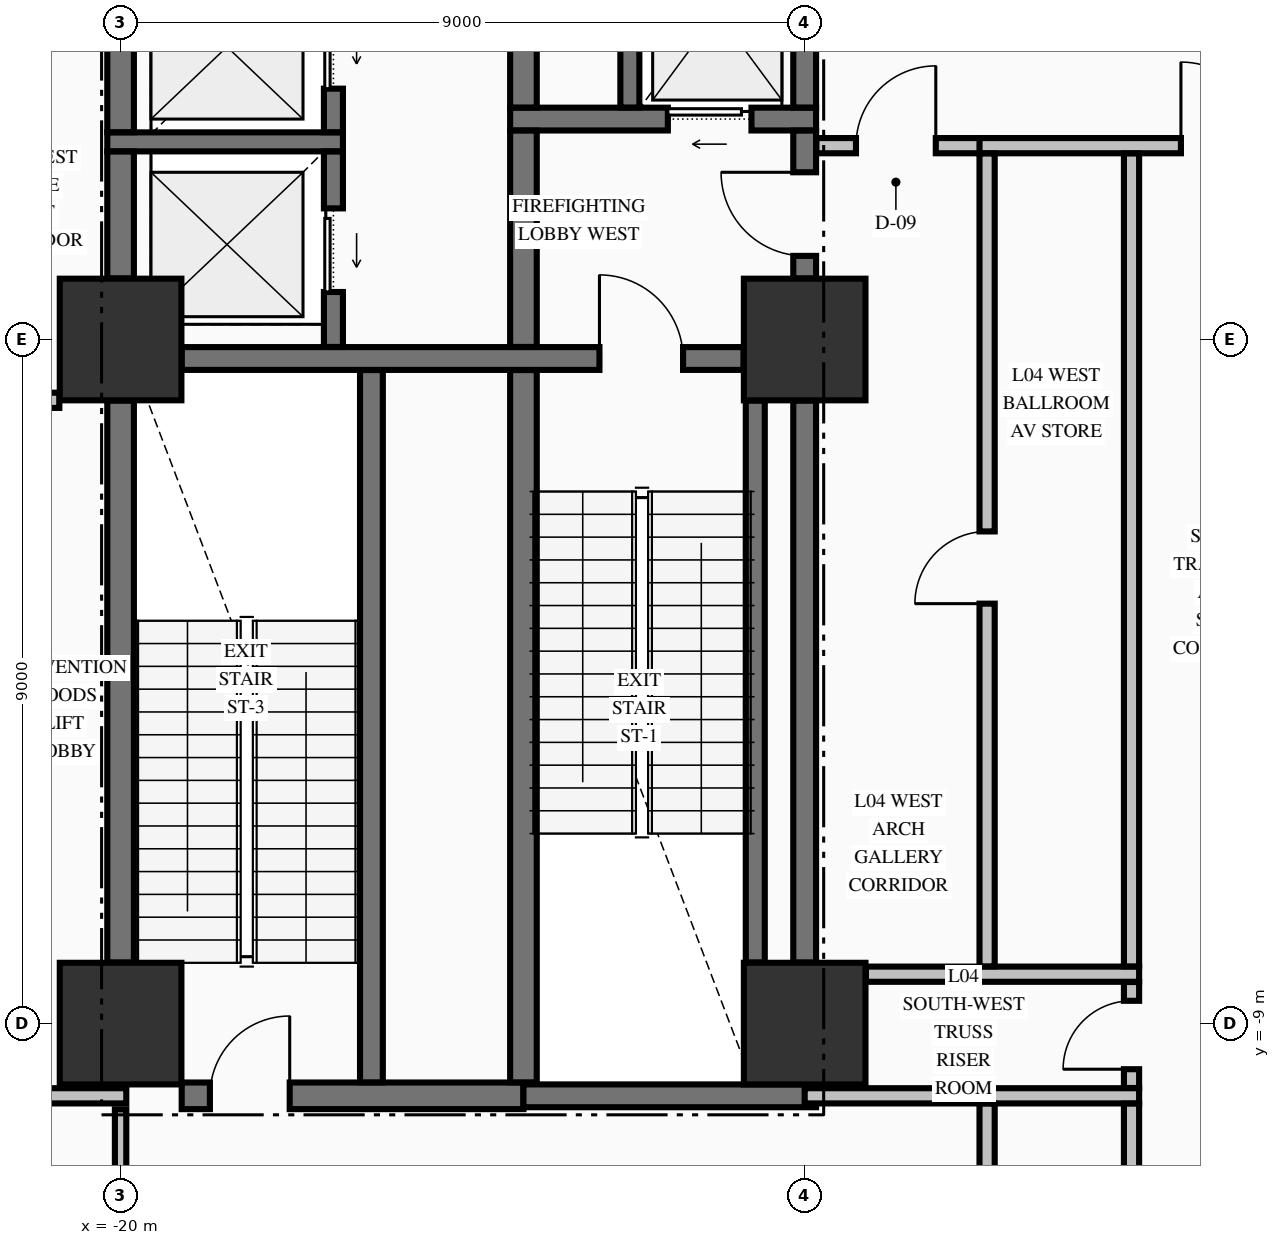
"""IFC4 building model, lengths in metres.
Left out: names, types, materials, properties, quantities, classifications, styles, units other than length and angle.
Written with IfcOpenShell. Run it as: python <this file> out.ifc"""

import sys

from ifc_helpers import new_model, si_unit, direction, frame, frame_2d, origin, origin_2d, place, context, subcontext, project, spatial, rectangle, extrude, element, fill, save


model = new_model("IFC4")
c1 = context("Model", 3, precision=1e-05, world=origin(), true_north=direction((0.0, 1.0)))
c2 = subcontext(c1, "Body", "Model", "MODEL_VIEW")
j1 = project(units=[si_unit("LENGTHUNIT", "METRE"), si_unit("PLANEANGLEUNIT", "RADIAN")], contexts=[c1])
p1 = place(None, origin())
s1 = spatial("IfcSite", under=j1, at=p1, CompositionType="ELEMENT")
p2 = place(p1, origin())
s2 = spatial("IfcBuilding", under=s1, at=p2, CompositionType="ELEMENT")
p3 = place(p2, frame((0.0, 0.0, 21.76)))
s3 = spatial("IfcBuildingStorey", under=s2, at=p3, CompositionType="ELEMENT", Elevation=21.76)
for number, where, z_axis, x_axis in (
    (1, (-20.0, -9.0, -0.45), (0.0, 0.0, 1.0), (1.0, 0.0, 0.0)),
    (2, (-20.0, 0.0, -0.45), (0.0, 0.0, 1.0), (1.0, 0.0, 0.0)),
    (3, (-11.0, -9.0, -0.45), (0.0, 0.0, 1.0), (1.0, 0.0, 0.0)),
    (4, (-11.0, 0.0, -0.45), (0.0, 0.0, 1.0), (1.0, 0.0, 0.0)),
):
    element("IfcColumn", number, at=place(p3, frame(where, z_axis=z_axis, x_axis=x_axis)), inside=s3, PredefinedType="COLUMN", context=c2, shape_type="SweptSolid", body=[
        extrude(rectangle(XDim=1.6, YDim=1.6, at=origin_2d()), origin(), (0.0, 0.0, 1.0), 5.44),
    ])
p4 = place(p3, frame((-19.196, -9.95, 0.0), z_axis=(0.0, 0.0, 1.0), x_axis=(1.0, 0.0, 0.0)))
e5 = element("IfcWall", 5, at=p4, inside=s3, PredefinedType="SHEAR", context=c2, shape_type="SweptSolid", body=[
    extrude(rectangle(XDim=4.496, YDim=0.35, at=frame_2d((2.248, 0.0))), origin(), (0.0, 0.0, 1.0), 4.99),
])
p5 = place(p4, frame((0.371, 0.0, 0.0)))
e6 = element("IfcOpeningElement", 6, at=p5, cuts=e5, PredefinedType="OPENING", context=c2, shape_type="SweptSolid", body=[
    extrude(rectangle(XDim=1.05, YDim=2.15, at=frame_2d((0.525, 1.075))), frame((0.0, 0.185, 0.0), z_axis=(0.0, -1.0, 0.0), x_axis=(1.0, 0.0, 0.0)), (0.0, 0.0, 1.0), 0.37),
])
p6 = place(p3, frame((-14.7, -9.95, 0.0), z_axis=(0.0, 0.0, 1.0), x_axis=(1.0, 0.0, 0.0)))
e7 = element("IfcWall", 7, at=p6, inside=s3, PredefinedType="SHEAR", context=c2, shape_type="SweptSolid", body=[
    extrude(rectangle(XDim=3.85, YDim=0.3, at=frame_2d((1.925, 0.0))), origin(), (0.0, 0.0, 1.0), 4.99),
])
p7 = place(p3, frame((-19.196, -0.25, 0.0), z_axis=(0.0, 0.0, 1.0), x_axis=(1.0, 0.0, 0.0)))
e8 = element("IfcWall", 8, at=p7, inside=s3, PredefinedType="SHEAR", context=c2, shape_type="SweptSolid", body=[
    extrude(rectangle(XDim=7.392, YDim=0.3, at=frame_2d((3.696, 0.0))), origin(), (0.0, 0.0, 1.0), 4.99),
])
p8 = place(p7, frame((5.496, 0.0, 0.0)))
e9 = element("IfcOpeningElement", 9, at=p8, cuts=e8, PredefinedType="OPENING", context=c2, shape_type="SweptSolid", body=[
    extrude(rectangle(XDim=1.1, YDim=2.15, at=frame_2d((0.55, 1.075))), frame((0.0, 0.16, 0.0), z_axis=(0.0, -1.0, 0.0), x_axis=(1.0, 0.0, 0.0)), (0.0, 0.0, 1.0), 0.32),
])
p9 = place(p3, frame((-20.175, 2.6, 0.0), z_axis=(0.0, 0.0, 1.0), x_axis=(1.0, 0.0, 0.0)))
e10 = element("IfcWall", 10, at=p9, inside=s3, PredefinedType="SOLIDWALL", context=c2, shape_type="SweptSolid", body=[
    extrude(rectangle(XDim=3.1, YDim=0.25, at=frame_2d((1.55, 0.0))), origin(), (0.0, 0.0, 1.0), 4.99),
])
p10 = place(p3, frame((-14.875, 2.9, 0.0), z_axis=(0.0, 0.0, 1.0), x_axis=(1.0, 0.0, 0.0)))
e11 = element("IfcWall", 11, at=p10, inside=s3, PredefinedType="SHEAR", context=c2, shape_type="SweptSolid", body=[
    extrude(rectangle(XDim=4.025, YDim=0.3, at=frame_2d((2.012, 0.0))), origin(), (0.0, 0.0, 1.0), 4.99),
])
p11 = place(p10, frame((2.075, 0.0, 0.0)))
e12 = element("IfcOpeningElement", 12, at=p11, cuts=e11, PredefinedType="OPENING", context=c2, shape_type="SweptSolid", body=[
    extrude(rectangle(XDim=1.1, YDim=2.2, at=frame_2d((0.55, 1.1))), frame((0.0, 0.16, 0.0), z_axis=(0.0, -1.0, 0.0), x_axis=(1.0, 0.0, 0.0)), (0.0, 0.0, 1.0), 0.32),
])
p12 = place(p3, frame((-22.475, -9.95, 0.0), z_axis=(0.0, 0.0, 1.0), x_axis=(1.0, 0.0, 0.0)))
e13 = element("IfcWall", 13, at=p12, inside=s3, PredefinedType="PARTITIONING", context=c2, shape_type="SweptSolid", body=[
    extrude(rectangle(XDim=2.55, YDim=0.2, at=frame_2d((1.275, 0.0))), origin(), (0.0, 0.0, 1.0), 4.99),
])
p13 = place(p12, frame((0.455, 0.0, 0.0)))
e14 = element("IfcOpeningElement", 14, at=p13, cuts=e13, PredefinedType="OPENING", context=c2, shape_type="SweptSolid", body=[
    extrude(rectangle(XDim=1.0, YDim=2.15, at=frame_2d((0.5, 1.075))), frame((0.0, 0.11, 0.0), z_axis=(0.0, -1.0, 0.0), x_axis=(1.0, 0.0, 0.0)), (0.0, 0.0, 1.0), 0.22),
])
p14 = place(p3, frame((-11.0, -9.95, 0.0), z_axis=(0.0, 0.0, 1.0), x_axis=(1.0, 0.0, 0.0)))
e15 = element("IfcWall", 15, at=p14, inside=s3, PredefinedType="PARTITIONING", context=c2, shape_type="SweptSolid", body=[
    extrude(rectangle(XDim=4.4, YDim=0.2, at=frame_2d((2.2, 0.0))), origin(), (0.0, 0.0, 1.0), 3.332),
])
p15 = place(p3, frame((-10.194, -8.35, 0.0), z_axis=(0.0, 0.0, 1.0), x_axis=(1.0, 0.0, 0.0)))
e16 = element("IfcWall", 16, at=p15, inside=s3, PredefinedType="PARTITIONING", context=c2, shape_type="SweptSolid", body=[
    extrude(rectangle(XDim=3.594, YDim=0.2, at=frame_2d((1.797, 0.0))), origin(), (0.0, 0.0, 1.0), 3.332),
])
p16 = place(p3, frame((-22.475, -0.8, 0.0), z_axis=(0.0, 0.0, 1.0), x_axis=(1.0, 0.0, 0.0)))
e17 = element("IfcWall", 17, at=p16, inside=s3, PredefinedType="PARTITIONING", context=c2, shape_type="SweptSolid", body=[
    extrude(rectangle(XDim=1.669, YDim=0.2, at=frame_2d((0.834, 0.0))), origin(), (0.0, 0.0, 1.0), 4.99),
])
p17 = place(p16, frame((0.425, 0.0, 0.0)))
e18 = element("IfcOpeningElement", 18, at=p17, cuts=e17, PredefinedType="OPENING", context=c2, shape_type="SweptSolid", body=[
    extrude(rectangle(XDim=1.0, YDim=2.15, at=frame_2d((0.5, 1.075))), frame((0.0, 0.11, 0.0), z_axis=(0.0, -1.0, 0.0), x_axis=(1.0, 0.0, 0.0)), (0.0, 0.0, 1.0), 0.22),
])
p18 = place(p3, frame((-10.847, 2.55, 0.0), z_axis=(0.0, 0.0, 1.0), x_axis=(1.0, 0.0, 0.0)))
e19 = element("IfcWall", 19, at=p18, inside=s3, PredefinedType="PARTITIONING", context=c2, shape_type="SweptSolid", body=[
    extrude(rectangle(XDim=2.347, YDim=0.2, at=frame_2d((1.173, 0.0))), origin(), (0.0, 0.0, 1.0), 4.99),
])
p19 = place(p18, frame((0.522, 0.0, 0.0)))
e20 = element("IfcOpeningElement", 20, at=p19, cuts=e19, PredefinedType="OPENING", context=c2, shape_type="SweptSolid", body=[
    extrude(rectangle(XDim=1.05, YDim=2.15, at=frame_2d((0.525, 1.075))), frame((0.0, 0.11, 0.0), z_axis=(0.0, -1.0, 0.0), x_axis=(1.0, 0.0, 0.0)), (0.0, 0.0, 1.0), 0.22),
])
p20 = place(p3, frame((-8.7, 2.55, 0.0), z_axis=(0.0, 0.0, 1.0), x_axis=(1.0, 0.0, 0.0)))
e21 = element("IfcWall", 21, at=p20, inside=s3, PredefinedType="PARTITIONING", context=c2, shape_type="SweptSolid", body=[
    extrude(rectangle(XDim=17.4, YDim=0.2, at=frame_2d((8.7, 0.0))), origin(), (0.0, 0.0, 1.0), 4.99),
])
p21 = place(p20, frame((2.65, 0.0, 0.0)))
e22 = element("IfcOpeningElement", 22, at=p21, cuts=e21, PredefinedType="OPENING", context=c2, shape_type="SweptSolid", body=[
    extrude(rectangle(XDim=1.1, YDim=2.15, at=frame_2d((0.55, 1.075))), frame((0.0, 0.11, 0.0), z_axis=(0.0, -1.0, 0.0), x_axis=(1.0, 0.0, 0.0)), (0.0, 0.0, 1.0), 0.22),
])
p22 = place(p20, frame((5.95, 0.0, 0.0)))
e23 = element("IfcOpeningElement", 23, at=p22, cuts=e21, PredefinedType="OPENING", context=c2, shape_type="SweptSolid", body=[
    extrude(rectangle(XDim=1.2, YDim=2.15, at=frame_2d((0.6, 1.075))), frame((0.0, 0.11, 0.0), z_axis=(0.0, -1.0, 0.0), x_axis=(1.0, 0.0, 0.0)), (0.0, 0.0, 1.0), 0.22),
])
p23 = place(p3, frame((-20.0, -8.196, 0.0), z_axis=(0.0, 0.0, 1.0), x_axis=(0.0, 1.0, 0.0)))
e24 = element("IfcWall", 24, at=p23, inside=s3, PredefinedType="SHEAR", context=c2, shape_type="SweptSolid", body=[
    extrude(rectangle(XDim=7.392, YDim=0.35, at=frame_2d((3.696, 0.0))), origin(), (0.0, 0.0, 1.0), 4.99),
])
p24 = place(p3, frame((-20.0, 0.804, 0.0), z_axis=(0.0, 0.0, 1.0), x_axis=(0.0, 1.0, 0.0)))
e25 = element("IfcWall", 25, at=p24, inside=s3, PredefinedType="SHEAR", context=c2, shape_type="SweptSolid", body=[
    extrude(rectangle(XDim=1.669, YDim=0.35, at=frame_2d((0.834, 0.0))), origin(), (0.0, 0.0, 1.0), 4.99),
])
p25 = place(p3, frame((-20.0, 2.727, 0.0), z_axis=(0.0, 0.0, 1.0), x_axis=(0.0, 1.0, 0.0)))
e26 = element("IfcWall", 26, at=p25, inside=s3, PredefinedType="SHEAR", context=c2, shape_type="SweptSolid", body=[
    extrude(rectangle(XDim=2.246, YDim=0.35, at=frame_2d((1.123, 0.0))), origin(), (0.0, 0.0, 1.0), 4.99),
])
p26 = place(p3, frame((-17.2, -0.098, 0.0), z_axis=(0.0, 0.0, 1.0), x_axis=(0.0, 1.0, 0.0)))
e27 = element("IfcWall", 27, at=p26, inside=s3, PredefinedType="SOLIDWALL", context=c2, shape_type="SweptSolid", body=[
    extrude(rectangle(XDim=2.571, YDim=0.25, at=frame_2d((1.285, 0.0))), origin(), (0.0, 0.0, 1.0), 4.99),
])
p27 = place(p26, frame((0.723, 0.0, 0.0)))
e28 = element("IfcOpeningElement", 28, at=p27, cuts=e27, PredefinedType="OPENING", context=c2, shape_type="SweptSolid", body=[
    extrude(rectangle(XDim=1.1, YDim=2.2, at=frame_2d((0.55, 1.1))), frame((0.0, 0.135, 0.0), z_axis=(0.0, -1.0, 0.0), x_axis=(1.0, 0.0, 0.0)), (0.0, 0.0, 1.0), 0.27),
])
p28 = place(p3, frame((-17.2, 2.727, 0.0), z_axis=(0.0, 0.0, 1.0), x_axis=(0.0, 1.0, 0.0)))
e29 = element("IfcWall", 29, at=p28, inside=s3, PredefinedType="SOLIDWALL", context=c2, shape_type="SweptSolid", body=[
    extrude(rectangle(XDim=2.246, YDim=0.25, at=frame_2d((1.123, 0.0))), origin(), (0.0, 0.0, 1.0), 4.99),
])
p29 = place(p28, frame((0.573, 0.0, 0.0)))
e30 = element("IfcOpeningElement", 30, at=p29, cuts=e29, PredefinedType="OPENING", context=c2, shape_type="SweptSolid", body=[
    extrude(rectangle(XDim=1.1, YDim=2.2, at=frame_2d((0.55, 1.1))), frame((0.0, 0.135, 0.0), z_axis=(0.0, -1.0, 0.0), x_axis=(1.0, 0.0, 0.0)), (0.0, 0.0, 1.0), 0.27),
])
p30 = place(p3, frame((-16.7, -9.773, 0.0), z_axis=(0.0, 0.0, 1.0), x_axis=(0.0, 1.0, 0.0)))
e31 = element("IfcWall", 31, at=p30, inside=s3, PredefinedType="SHEAR", context=c2, shape_type="SweptSolid", body=[
    extrude(rectangle(XDim=9.371, YDim=0.3, at=frame_2d((4.686, 0.0))), origin(), (0.0, 0.0, 1.0), 4.99),
])
p31 = place(p3, frame((-14.7, -9.773, 0.0), z_axis=(0.0, 0.0, 1.0), x_axis=(0.0, 1.0, 0.0)))
e32 = element("IfcWall", 32, at=p31, inside=s3, PredefinedType="SHEAR", context=c2, shape_type="SweptSolid", body=[
    extrude(rectangle(XDim=9.371, YDim=0.35, at=frame_2d((4.686, 0.0))), origin(), (0.0, 0.0, 1.0), 4.99),
])
p32 = place(p3, frame((-14.7, -0.098, 0.0), z_axis=(0.0, 0.0, 1.0), x_axis=(0.0, 1.0, 0.0)))
e33 = element("IfcWall", 33, at=p32, inside=s3, PredefinedType="SHEAR", context=c2, shape_type="SweptSolid", body=[
    extrude(rectangle(XDim=2.846, YDim=0.35, at=frame_2d((1.423, 0.0))), origin(), (0.0, 0.0, 1.0), 4.99),
])
p33 = place(p3, frame((-14.7, 3.052, 0.0), z_axis=(0.0, 0.0, 1.0), x_axis=(0.0, 1.0, 0.0)))
e34 = element("IfcWall", 34, at=p33, inside=s3, PredefinedType="SHEAR", context=c2, shape_type="SweptSolid", body=[
    extrude(rectangle(XDim=2.496, YDim=0.35, at=frame_2d((1.248, 0.0))), origin(), (0.0, 0.0, 1.0), 4.99),
])
p34 = place(p3, frame((-13.3, 3.052, 0.0), z_axis=(0.0, 0.0, 1.0), x_axis=(0.0, 1.0, 0.0)))
e35 = element("IfcWall", 35, at=p34, inside=s3, PredefinedType="SOLIDWALL", context=c2, shape_type="SweptSolid", body=[
    extrude(rectangle(XDim=2.496, YDim=0.25, at=frame_2d((1.248, 0.0))), origin(), (0.0, 0.0, 1.0), 4.99),
])
p35 = place(p3, frame((-11.65, -8.196, 0.0), z_axis=(0.0, 0.0, 1.0), x_axis=(0.0, 1.0, 0.0)))
e36 = element("IfcWall", 36, at=p35, inside=s3, PredefinedType="SOLIDWALL", context=c2, shape_type="SweptSolid", body=[
    extrude(rectangle(XDim=7.392, YDim=0.25, at=frame_2d((3.696, 0.0))), origin(), (0.0, 0.0, 1.0), 4.99),
])
p36 = place(p3, frame((-11.0, -8.196, 0.0), z_axis=(0.0, 0.0, 1.0), x_axis=(0.0, 1.0, 0.0)))
e37 = element("IfcWall", 37, at=p36, inside=s3, PredefinedType="SHEAR", context=c2, shape_type="SweptSolid", body=[
    extrude(rectangle(XDim=7.392, YDim=0.3, at=frame_2d((3.696, 0.0))), origin(), (0.0, 0.0, 1.0), 4.99),
])
p37 = place(p3, frame((-11.0, 0.804, 0.0), z_axis=(0.0, 0.0, 1.0), x_axis=(0.0, 1.0, 0.0)))
e38 = element("IfcWall", 38, at=p37, inside=s3, PredefinedType="SHEAR", context=c2, shape_type="SweptSolid", body=[
    extrude(rectangle(XDim=1.944, YDim=0.3, at=frame_2d((0.972, 0.0))), origin(), (0.0, 0.0, 1.0), 4.99),
])
p38 = place(p37, frame((0.296, 0.0, 0.0)))
e39 = element("IfcOpeningElement", 39, at=p38, cuts=e38, PredefinedType="OPENING", context=c2, shape_type="SweptSolid", body=[
    extrude(rectangle(XDim=1.1, YDim=2.15, at=frame_2d((0.55, 1.075))), frame((0.0, 0.16, 0.0), z_axis=(0.0, -1.0, 0.0), x_axis=(1.0, 0.0, 0.0)), (0.0, 0.0, 1.0), 0.32),
])
p39 = place(p3, frame((-11.0, 3.052, 0.0), z_axis=(0.0, 0.0, 1.0), x_axis=(0.0, 1.0, 0.0)))
e40 = element("IfcWall", 40, at=p39, inside=s3, PredefinedType="SHEAR", context=c2, shape_type="SweptSolid", body=[
    extrude(rectangle(XDim=2.496, YDim=0.3, at=frame_2d((1.248, 0.0))), origin(), (0.0, 0.0, 1.0), 4.99),
])
p40 = place(p3, frame((-20.0, -15.194, 0.0), z_axis=(0.0, 0.0, 1.0), x_axis=(0.0, 1.0, 0.0)))
e41 = element("IfcWall", 41, at=p40, inside=s3, PredefinedType="PARTITIONING", context=c2, shape_type="SweptSolid", body=[
    extrude(rectangle(XDim=5.066, YDim=0.15, at=frame_2d((2.533, 0.0))), origin(), (0.0, 0.0, 1.0), 3.332),
])
p41 = place(p40, frame((1.569, 0.0, 0.0)))
e42 = element("IfcOpeningElement", 42, at=p41, cuts=e41, PredefinedType="OPENING", context=c2, shape_type="SweptSolid", body=[
    extrude(rectangle(XDim=1.05, YDim=2.15, at=frame_2d((0.525, 1.075))), frame((0.0, 0.085, 0.0), z_axis=(0.0, -1.0, 0.0), x_axis=(1.0, 0.0, 0.0)), (0.0, 0.0, 1.0), 0.17),
])
p42 = place(p3, frame((-8.6, -15.447, 0.0), z_axis=(0.0, 0.0, 1.0), x_axis=(0.0, 1.0, 0.0)))
e43 = element("IfcWall", 43, at=p42, inside=s3, PredefinedType="PARTITIONING", context=c2, shape_type="SweptSolid", body=[
    extrude(rectangle(XDim=5.394, YDim=0.2, at=frame_2d((2.697, 0.0))), origin(), (0.0, 0.0, 1.0), 4.99),
])
p43 = place(p3, frame((-8.6, -8.247, 0.0), z_axis=(0.0, 0.0, 1.0), x_axis=(0.0, 1.0, 0.0)))
e44 = element("IfcWall", 44, at=p43, inside=s3, PredefinedType="PARTITIONING", context=c2, shape_type="SweptSolid", body=[
    extrude(rectangle(XDim=10.694, YDim=0.2, at=frame_2d((5.347, 0.0))), origin(), (0.0, 0.0, 1.0), 4.99),
])
p44 = place(p43, frame((4.772, 0.0, 0.0)))
e45 = element("IfcOpeningElement", 45, at=p44, cuts=e44, PredefinedType="OPENING", context=c2, shape_type="SweptSolid", body=[
    extrude(rectangle(XDim=0.95, YDim=2.15, at=frame_2d((0.475, 1.075))), frame((0.0, 0.11, 0.0), z_axis=(0.0, -1.0, 0.0), x_axis=(1.0, 0.0, 0.0)), (0.0, 0.0, 1.0), 0.22),
])
p45 = place(p3, frame((-6.7, -15.447, 0.0), z_axis=(0.0, 0.0, 1.0), x_axis=(0.0, 1.0, 0.0)))
e46 = element("IfcWall", 46, at=p45, inside=s3, PredefinedType="PARTITIONING", context=c2, shape_type="SweptSolid", body=[
    extrude(rectangle(XDim=5.394, YDim=0.2, at=frame_2d((2.697, 0.0))), origin(), (0.0, 0.0, 1.0), 4.99),
])
p46 = place(p3, frame((-6.7, -9.847, 0.0), z_axis=(0.0, 0.0, 1.0), x_axis=(0.0, 1.0, 0.0)))
e47 = element("IfcWall", 47, at=p46, inside=s3, PredefinedType="PARTITIONING", context=c2, shape_type="SweptSolid", body=[
    extrude(rectangle(XDim=1.394, YDim=0.2, at=frame_2d((0.697, 0.0))), origin(), (0.0, 0.0, 1.0), 4.99),
])
p47 = place(p46, frame((0.247, 0.0, 0.0)))
e48 = element("IfcOpeningElement", 48, at=p47, cuts=e47, PredefinedType="OPENING", context=c2, shape_type="SweptSolid", body=[
    extrude(rectangle(XDim=0.9, YDim=2.15, at=frame_2d((0.45, 1.075))), frame((0.0, 0.11, 0.0), z_axis=(0.0, -1.0, 0.0), x_axis=(1.0, 0.0, 0.0)), (0.0, 0.0, 1.0), 0.22),
])
p48 = place(p3, frame((-6.7, -8.247, 0.0), z_axis=(0.0, 0.0, 1.0), x_axis=(0.0, 1.0, 0.0)))
e49 = element("IfcWall", 49, at=p48, inside=s3, PredefinedType="PARTITIONING", context=c2, shape_type="SweptSolid", body=[
    extrude(rectangle(XDim=10.694, YDim=0.2, at=frame_2d((5.347, 0.0))), origin(), (0.0, 0.0, 1.0), 4.99),
])
p49 = place(p8, origin())
e50 = element("IfcDoor", 50, at=p49, inside=s3, OperationType="SINGLE_SWING_LEFT", PredefinedType="DOOR", context=c2, shape_type="SweptSolid", body=[
    extrude(rectangle(XDim=1.1, YDim=2.15, at=frame_2d((0.55, 1.075))), frame((0.0, 0.025, 0.0), z_axis=(0.0, -1.0, 0.0), x_axis=(1.0, 0.0, 0.0)), (0.0, 0.0, 1.0), 0.05),
])
fill(e9, e50)
p50 = place(p38, origin())
e51 = element("IfcDoor", 51, at=p50, inside=s3, OperationType="SINGLE_SWING_RIGHT", PredefinedType="DOOR", context=c2, shape_type="SweptSolid", body=[
    extrude(rectangle(XDim=1.1, YDim=2.15, at=frame_2d((0.55, 1.075))), frame((0.0, 0.025, 0.0), z_axis=(0.0, -1.0, 0.0), x_axis=(1.0, 0.0, 0.0)), (0.0, 0.0, 1.0), 0.05),
])
fill(e39, e51)
p51 = place(p11, origin())
e52 = element("IfcDoor", 52, at=p51, inside=s3, OperationType="SLIDING_TO_LEFT", PredefinedType="DOOR", context=c2, shape_type="SweptSolid", body=[
    extrude(rectangle(XDim=1.1, YDim=2.2, at=frame_2d((0.55, 1.1))), frame((0.0, 0.025, 0.0), z_axis=(0.0, -1.0, 0.0), x_axis=(1.0, 0.0, 0.0)), (0.0, 0.0, 1.0), 0.05),
])
fill(e12, e52)
p52 = place(p5, origin())
e53 = element("IfcDoor", 53, at=p52, inside=s3, OperationType="SINGLE_SWING_RIGHT", PredefinedType="DOOR", context=c2, shape_type="SweptSolid", body=[
    extrude(rectangle(XDim=1.05, YDim=2.15, at=frame_2d((0.525, 1.075))), frame((0.0, 0.025, 0.0), z_axis=(0.0, -1.0, 0.0), x_axis=(1.0, 0.0, 0.0)), (0.0, 0.0, 1.0), 0.05),
])
fill(e6, e53)
p53 = place(p27, origin())
e54 = element("IfcDoor", 54, at=p53, inside=s3, OperationType="SLIDING_TO_LEFT", PredefinedType="DOOR", context=c2, shape_type="SweptSolid", body=[
    extrude(rectangle(XDim=1.1, YDim=2.2, at=frame_2d((0.55, 1.1))), frame((0.0, 0.025, 0.0), z_axis=(0.0, -1.0, 0.0), x_axis=(1.0, 0.0, 0.0)), (0.0, 0.0, 1.0), 0.05),
])
fill(e28, e54)
p54 = place(p29, origin())
e55 = element("IfcDoor", 55, at=p54, inside=s3, OperationType="SLIDING_TO_LEFT", PredefinedType="DOOR", context=c2, shape_type="SweptSolid", body=[
    extrude(rectangle(XDim=1.1, YDim=2.2, at=frame_2d((0.55, 1.1))), frame((0.0, 0.025, 0.0), z_axis=(0.0, -1.0, 0.0), x_axis=(1.0, 0.0, 0.0)), (0.0, 0.0, 1.0), 0.05),
])
fill(e30, e55)
p55 = place(p19, origin())
e56 = element("IfcDoor", 56, at=p55, inside=s3, OperationType="SINGLE_SWING_RIGHT", PredefinedType="DOOR", context=c2, shape_type="SweptSolid", body=[
    extrude(rectangle(XDim=1.05, YDim=2.15, at=frame_2d((0.525, 1.075))), frame((0.0, 0.025, 0.0), z_axis=(0.0, -1.0, 0.0), x_axis=(1.0, 0.0, 0.0)), (0.0, 0.0, 1.0), 0.05),
])
fill(e20, e56)
p56 = place(p21, origin())
e57 = element("IfcDoor", 57, at=p56, inside=s3, OperationType="SINGLE_SWING_LEFT", PredefinedType="DOOR", context=c2, shape_type="SweptSolid", body=[
    extrude(rectangle(XDim=1.1, YDim=2.15, at=frame_2d((0.55, 1.075))), frame((0.0, 0.025, 0.0), z_axis=(0.0, -1.0, 0.0), x_axis=(1.0, 0.0, 0.0)), (0.0, 0.0, 1.0), 0.05),
])
fill(e22, e57)
p57 = place(p47, origin())
e58 = element("IfcDoor", 58, at=p57, inside=s3, OperationType="SINGLE_SWING_LEFT", PredefinedType="DOOR", context=c2, shape_type="SweptSolid", body=[
    extrude(rectangle(XDim=0.9, YDim=2.15, at=frame_2d((0.45, 1.075))), frame((0.0, 0.025, 0.0), z_axis=(0.0, -1.0, 0.0), x_axis=(1.0, 0.0, 0.0)), (0.0, 0.0, 1.0), 0.05),
])
fill(e48, e58)
p58 = place(p44, origin())
e59 = element("IfcDoor", 59, at=p58, inside=s3, OperationType="SINGLE_SWING_LEFT", PredefinedType="DOOR", context=c2, shape_type="SweptSolid", body=[
    extrude(rectangle(XDim=0.95, YDim=2.15, at=frame_2d((0.475, 1.075))), frame((0.0, 0.025, 0.0), z_axis=(0.0, -1.0, 0.0), x_axis=(1.0, 0.0, 0.0)), (0.0, 0.0, 1.0), 0.05),
])
fill(e45, e59)
save(model, sys.argv[1])
